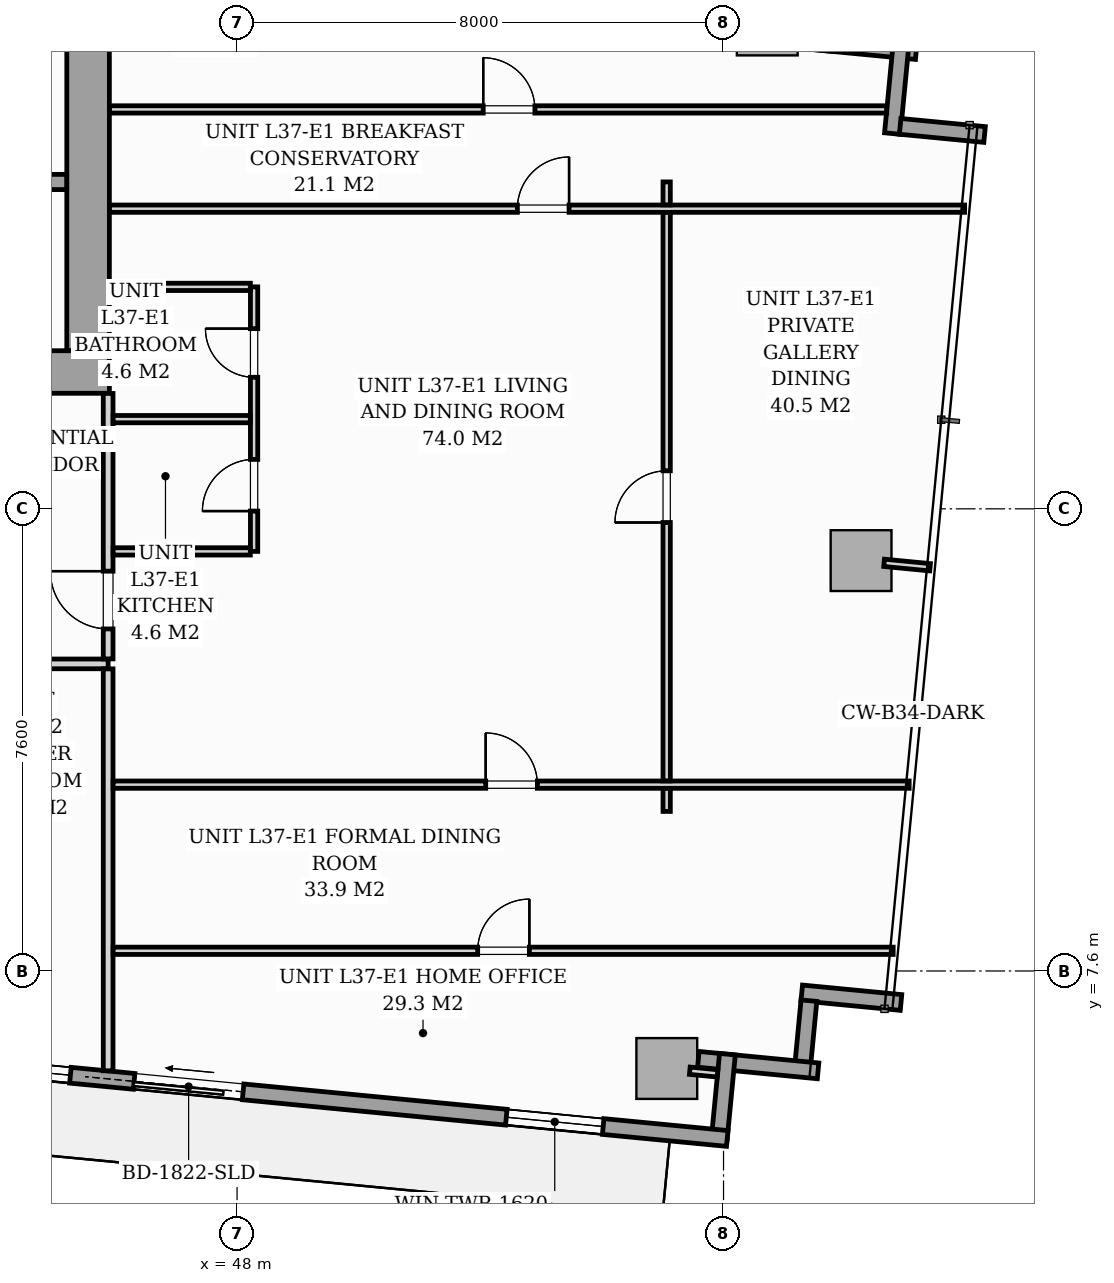
"""IFC4 building model, lengths in metres.
Left out: names, types, materials, properties, quantities, classifications, styles, units other than length and angle.
Written with IfcOpenShell. Run it as: python <this file> out.ifc"""

import sys

from ifc_helpers import new_model, si_unit, direction, frame, frame_2d, origin, origin_2d, place, context, subcontext, project, spatial, rectangle, i_section, extrude, source, transform, mapped, element, fill, save


model = new_model("IFC4")
c1 = context("Model", 3, precision=1e-05, world=origin(), true_north=direction((0.0, 1.0)))
c2 = subcontext(c1, "Body", "Model", "MODEL_VIEW")
j1 = project(units=[si_unit("LENGTHUNIT", "METRE"), si_unit("PLANEANGLEUNIT", "RADIAN")], contexts=[c1])
p1 = place(None, origin())
s1 = spatial("IfcSite", under=j1, at=p1, CompositionType="ELEMENT")
p2 = place(p1, origin())
s2 = spatial("IfcBuilding", under=s1, at=p2, CompositionType="ELEMENT")
p3 = place(p2, frame((0.0, 0.0, 131.0)))
s3 = spatial("IfcBuildingStorey", under=s2, at=p3, CompositionType="ELEMENT", Elevation=131.0)
m1 = source(origin(), c2, "Body", "SweptSolid", [
    extrude(i_section(OverallWidth=0.421, OverallDepth=0.465, WebThickness=0.045, FlangeThickness=0.073, FilletRadius=0.018, at=origin_2d()), origin(), (0.0, 0.0, 1.0), 3.196),
])
p4 = place(p3, frame((45.6, 17.4, 0.002), z_axis=(0.0, 0.0, 1.0), x_axis=(1.0, 0.0, 0.0)))
e1 = element("IfcColumn", 1, at=p4, inside=s3, PredefinedType="PILASTER", context=c2, shape_type="MappedRepresentation", body=[
    mapped(m1, transform((0.0, 0.0, 0.0), scale=1.0)),
])
m2 = source(origin(), c2, "Body", "SweptSolid", [
    extrude(rectangle(XDim=1.0, YDim=1.0, at=origin_2d()), origin(), (0.0, 0.0, 1.0), 3.196),
])
for number, where, z_axis, x_axis in (
    (2, (55.067, 5.996, 0.002), (0.0, 0.0, 1.0), (0.995, -0.096, 0.0)),
    (3, (56.719, 23.157, 0.002), (0.0, 0.0, 1.0), (0.995, -0.096, 0.0)),
    (4, (58.262, 14.348, 0.002), (0.0, 0.0, 1.0), (0.995, -0.096, 0.0)),
):
    element("IfcColumn", number, at=place(p3, frame(where, z_axis=z_axis, x_axis=x_axis)), inside=s3, PredefinedType="COLUMN", context=c2, shape_type="MappedRepresentation", body=[
        mapped(m2, transform((0.0, 0.0, 0.0), scale=1.0)),
    ])
p5 = place(p3, frame((57.2, 22.909, 0.0), z_axis=(0.0, 0.0, 1.0), x_axis=(0.995401789159, -0.095787672171, 0.0)))
e5 = element("IfcWall", 5, at=p5, inside=s3, PredefinedType="STANDARD", context=c2, shape_type="SweptSolid", body=[
    extrude(rectangle(XDim=1.978, YDim=0.26, at=frame_2d((0.989, 0.0))), origin(), (0.0, 0.0, 1.0), 2.94),
])
for number, where, z_axis, x_axis in (
    (6, (58.912, 22.76, 0.0), (0.0, 0.0, 1.0), (-0.096, -0.995, 0.0)),
    (7, (58.905, 21.49, 0.0), (0.0, 0.0, 1.0), (0.995, -0.096, 0.0)),
):
    element("IfcWall", number, at=place(p3, frame(where, z_axis=z_axis, x_axis=x_axis)), inside=s3, PredefinedType="STANDARD", context=c2, shape_type="SweptSolid", body=[
        extrude(rectangle(XDim=1.395, YDim=0.26, at=frame_2d((0.698, 0.0))), origin(), (0.0, 0.0, 1.0), 2.94),
    ])
p6 = place(p3, frame((58.919, 7.082, 0.0), z_axis=(0.0, 0.0, 1.0), x_axis=(-0.995393194909, 0.095876939504, 0.0)))
e8 = element("IfcWall", 8, at=p6, inside=s3, PredefinedType="STANDARD", context=c2, shape_type="SweptSolid", body=[
    extrude(rectangle(XDim=1.64, YDim=0.26, at=frame_2d((0.82, 0.0))), origin(), (0.0, 0.0, 1.0), 2.94),
])
p7 = place(p3, frame((57.405, 7.112, 0.0), z_axis=(0.0, 0.0, 1.0), x_axis=(-0.095971333708, -0.995384098279, 0.0)))
e9 = element("IfcWall", 9, at=p7, inside=s3, PredefinedType="STANDARD", context=c2, shape_type="SweptSolid", body=[
    extrude(rectangle(XDim=1.15, YDim=0.26, at=frame_2d((0.575, 0.0))), origin(), (0.0, 0.0, 1.0), 2.94),
])
p8 = place(p3, frame((57.555, 5.958, 0.0), z_axis=(0.0, 0.0, 1.0), x_axis=(-0.995401789159, 0.095787672171, 0.0)))
e10 = element("IfcWall", 10, at=p8, inside=s3, PredefinedType="STANDARD", context=c2, shape_type="SweptSolid", body=[
    extrude(rectangle(XDim=1.978, YDim=0.26, at=frame_2d((0.989, 0.0))), origin(), (0.0, 0.0, 1.0), 2.94),
])
p9 = place(p3, frame((56.064, 6.232, 0.0), z_axis=(0.0, 0.0, 1.0), x_axis=(-0.09589913835, -0.995391056452, 0.0)))
e11 = element("IfcWall", 11, at=p9, inside=s3, PredefinedType="STANDARD", context=c2, shape_type="SweptSolid", body=[
    extrude(rectangle(XDim=1.395, YDim=0.26, at=frame_2d((0.698, 0.0))), origin(), (0.0, 0.0, 1.0), 2.94),
])
p10 = place(p3, frame((56.061, 4.845, 0.0), z_axis=(0.0, 0.0, 1.0), x_axis=(-0.995395976631, 0.095848055311, 0.0)))
e12 = element("IfcWall", 12, at=p10, inside=s3, PredefinedType="STANDARD", context=c2, shape_type="SweptSolid", body=[
    extrude(rectangle(XDim=17.01, YDim=0.26, at=frame_2d((8.505, 0.0))), origin(), (0.0, 0.0, 1.0), 2.94),
])
p11 = place(p10, frame((7.999, 0.0, 0.0)))
e13 = element("IfcOpeningElement", 13, at=p11, cuts=e12, PredefinedType="OPENING", context=c2, shape_type="SweptSolid", body=[
    extrude(rectangle(XDim=1.8, YDim=2.06, at=frame_2d((0.9, 1.03))), frame((0.0, 0.14, 0.0), z_axis=(0.0, -1.0, 0.0), x_axis=(1.0, 0.0, 0.0)), (0.0, 0.0, 1.0), 0.28),
])
p12 = place(p10, frame((2.05, 0.0, 0.65)))
e14 = element("IfcOpeningElement", 14, at=p12, cuts=e12, PredefinedType="OPENING", context=c2, shape_type="SweptSolid", body=[
    extrude(rectangle(XDim=1.6, YDim=1.5, at=frame_2d((0.8, 0.75))), frame((0.0, 0.14, 0.0), z_axis=(0.0, -1.0, 0.0), x_axis=(1.0, 0.0, 0.0)), (0.0, 0.0, 1.0), 0.28),
])
p13 = place(p10, frame((10.852, 0.0, 0.75)))
e15 = element("IfcOpeningElement", 15, at=p13, cuts=e12, PredefinedType="OPENING", context=c2, shape_type="SweptSolid", body=[
    extrude(rectangle(XDim=1.6, YDim=1.5, at=frame_2d((0.8, 0.75))), frame((0.0, 0.14, 0.0), z_axis=(0.0, -1.0, 0.0), x_axis=(1.0, 0.0, 0.0)), (0.0, 0.0, 1.0), 0.28),
])
p14 = place(p3, frame((26.1, 17.45, 0.0), z_axis=(0.0, 0.0, 1.0), x_axis=(1.0, 0.0, 0.0)))
e16 = element("IfcWall", 16, at=p14, inside=s3, PredefinedType="SHEAR", context=c2, shape_type="SweptSolid", body=[
    extrude(rectangle(XDim=19.8, YDim=0.7, at=frame_2d((9.9, 0.0))), origin(), (0.0, 0.0, 1.0), 3.2),
])
p15 = place(p14, frame((1.05, 0.0, 0.0)))
e17 = element("IfcOpeningElement", 17, at=p15, cuts=e16, PredefinedType="OPENING", context=c2, shape_type="SweptSolid", body=[
    extrude(rectangle(XDim=0.95, YDim=2.06, at=frame_2d((0.475, 1.03))), frame((0.0, 0.36, 0.0), z_axis=(0.0, -1.0, 0.0), x_axis=(1.0, 0.0, 0.0)), (0.0, 0.0, 1.0), 0.72),
])
p16 = place(p14, frame((9.48, 0.0, 0.0)))
e18 = element("IfcOpeningElement", 18, at=p16, cuts=e16, PredefinedType="OPENING", context=c2, shape_type="SweptSolid", body=[
    extrude(rectangle(XDim=0.85, YDim=2.0, at=frame_2d((0.425, 1.0))), frame((0.0, 0.36, 0.0), z_axis=(0.0, -1.0, 0.0), x_axis=(1.0, 0.0, 0.0)), (0.0, 0.0, 1.0), 0.72),
])
p17 = place(p14, frame((17.65, 0.0, 0.0)))
e19 = element("IfcOpeningElement", 19, at=p17, cuts=e16, PredefinedType="OPENING", context=c2, shape_type="SweptSolid", body=[
    extrude(rectangle(XDim=0.95, YDim=2.06, at=frame_2d((0.475, 1.03))), frame((0.0, 0.36, 0.0), z_axis=(0.0, -1.0, 0.0), x_axis=(1.0, 0.0, 0.0)), (0.0, 0.0, 1.0), 0.72),
])
p18 = place(p3, frame((45.55, 17.802, 0.0), z_axis=(0.0, 0.0, 1.0), x_axis=(0.0, 1.0, 0.0)))
e20 = element("IfcWall", 20, at=p18, inside=s3, PredefinedType="SHEAR", context=c2, shape_type="SweptSolid", body=[
    extrude(rectangle(XDim=5.796, YDim=0.7, at=frame_2d((2.898, 0.0))), origin(), (0.0, 0.0, 1.0), 3.2),
])
p19 = place(p3, frame((37.05, 20.575, 0.0), z_axis=(0.0, 0.0, 1.0), x_axis=(1.0, 0.0, 0.0)))
e21 = element("IfcWall", 21, at=p19, inside=s3, PredefinedType="SOLIDWALL", context=c2, shape_type="SweptSolid", body=[
    extrude(rectangle(XDim=8.148, YDim=0.25, at=frame_2d((4.074, 0.0))), origin(), (0.0, 0.0, 1.0), 3.2),
])
p20 = place(p19, frame((6.6, 0.0, 0.0)))
e22 = element("IfcOpeningElement", 22, at=p20, cuts=e21, PredefinedType="OPENING", context=c2, shape_type="SweptSolid", body=[
    extrude(rectangle(XDim=0.95, YDim=2.06, at=frame_2d((0.475, 1.03))), frame((0.0, 0.135, 0.0), z_axis=(0.0, -1.0, 0.0), x_axis=(1.0, 0.0, 0.0)), (0.0, 0.0, 1.0), 0.27),
])
p21 = place(p3, frame((22.05, 12.65, 0.0), z_axis=(0.0, 0.0, 1.0), x_axis=(1.0, 0.0, 0.0)))
e23 = element("IfcWall", 23, at=p21, inside=s3, PredefinedType="PARTITIONING", context=c2, shape_type="SweptSolid", body=[
    extrude(rectangle(XDim=23.83, YDim=0.16, at=frame_2d((11.915, 0.0))), origin(), (0.0, 0.0, 1.0), 2.94),
])
p22 = place(p21, frame((3.0, 0.0, 0.0)))
e24 = element("IfcOpeningElement", 24, at=p22, cuts=e23, PredefinedType="OPENING", context=c2, shape_type="SweptSolid", body=[
    extrude(rectangle(XDim=0.95, YDim=2.06, at=frame_2d((0.475, 1.03))), frame((0.0, 0.09, 0.0), z_axis=(0.0, -1.0, 0.0), x_axis=(1.0, 0.0, 0.0)), (0.0, 0.0, 1.0), 0.18),
])
p23 = place(p21, frame((15.485, 0.0, 0.0)))
e25 = element("IfcOpeningElement", 25, at=p23, cuts=e23, PredefinedType="OPENING", context=c2, shape_type="SweptSolid", body=[
    extrude(rectangle(XDim=0.95, YDim=2.06, at=frame_2d((0.475, 1.03))), frame((0.0, 0.09, 0.0), z_axis=(0.0, -1.0, 0.0), x_axis=(1.0, 0.0, 0.0)), (0.0, 0.0, 1.0), 0.18),
])
p24 = place(p3, frame((45.88, 5.958, 0.0), z_axis=(0.0, 0.0, 1.0), x_axis=(0.0, 1.0, 0.0)))
e26 = element("IfcWall", 26, at=p24, inside=s3, PredefinedType="PARTITIONING", context=c2, shape_type="SweptSolid", body=[
    extrude(rectangle(XDim=6.61, YDim=0.16, at=frame_2d((3.305, 0.0))), origin(), (0.0, 0.0, 1.0), 2.94),
])
p25 = place(p3, frame((45.88, 12.732, 0.0), z_axis=(0.0, 0.0, 1.0), x_axis=(0.0, 1.0, 0.0)))
e27 = element("IfcWall", 27, at=p25, inside=s3, PredefinedType="PARTITIONING", context=c2, shape_type="SweptSolid", body=[
    extrude(rectangle(XDim=4.366, YDim=0.16, at=frame_2d((2.183, 0.0))), origin(), (0.0, 0.0, 1.0), 2.94),
])
p26 = place(p25, frame((0.493, 0.0, 0.0)))
e28 = element("IfcOpeningElement", 28, at=p26, cuts=e27, PredefinedType="OPENING", context=c2, shape_type="SweptSolid", body=[
    extrude(rectangle(XDim=0.95, YDim=2.06, at=frame_2d((0.475, 1.03))), frame((0.0, 0.09, 0.0), z_axis=(0.0, -1.0, 0.0), x_axis=(1.0, 0.0, 0.0)), (0.0, 0.0, 1.0), 0.18),
])
p27 = place(p3, frame((48.28, 14.5, 0.0), z_axis=(0.0, 0.0, 1.0), x_axis=(0.0, 1.0, 0.0)))
e29 = element("IfcWall", 29, at=p27, inside=s3, PredefinedType="PARTITIONING", context=c2, shape_type="SweptSolid", body=[
    extrude(rectangle(XDim=4.35, YDim=0.12, at=frame_2d((2.175, 0.0))), origin(), (0.0, 0.0, 1.0), 2.94),
])
p28 = place(p27, frame((0.663, 0.0, 0.0)))
e30 = element("IfcOpeningElement", 30, at=p28, cuts=e29, PredefinedType="OPENING", context=c2, shape_type="SweptSolid", body=[
    extrude(rectangle(XDim=0.85, YDim=2.05, at=frame_2d((0.425, 1.025))), frame((0.0, 0.07, 0.0), z_axis=(0.0, -1.0, 0.0), x_axis=(1.0, 0.0, 0.0)), (0.0, 0.0, 1.0), 0.14),
])
p29 = place(p27, frame((2.863, 0.0, 0.0)))
e31 = element("IfcOpeningElement", 31, at=p29, cuts=e29, PredefinedType="OPENING", context=c2, shape_type="SweptSolid", body=[
    extrude(rectangle(XDim=0.8, YDim=2.02, at=frame_2d((0.4, 1.01))), frame((0.0, 0.07, 0.0), z_axis=(0.0, -1.0, 0.0), x_axis=(1.0, 0.0, 0.0)), (0.0, 0.0, 1.0), 0.14),
])
p30 = place(p3, frame((45.962, 16.675, 0.0), z_axis=(0.0, 0.0, 1.0), x_axis=(1.0, 0.0, 0.0)))
e32 = element("IfcWall", 32, at=p30, inside=s3, PredefinedType="PARTITIONING", context=c2, shape_type="SweptSolid", body=[
    extrude(rectangle(XDim=2.256, YDim=0.12, at=frame_2d((1.128, 0.0))), origin(), (0.0, 0.0, 1.0), 2.063),
])
p31 = place(p3, frame((45.962, 14.5, 0.0), z_axis=(0.0, 0.0, 1.0), x_axis=(1.0, 0.0, 0.0)))
e33 = element("IfcWall", 33, at=p31, inside=s3, PredefinedType="PARTITIONING", context=c2, shape_type="SweptSolid", body=[
    extrude(rectangle(XDim=2.256, YDim=0.12, at=frame_2d((1.128, 0.0))), origin(), (0.0, 0.0, 1.0), 2.94),
])
p32 = place(p3, frame((45.902, 18.85, 0.0), z_axis=(0.0, 0.0, 1.0), x_axis=(1.0, 0.0, 0.0)))
e34 = element("IfcWall", 34, at=p32, inside=s3, PredefinedType="PARTITIONING", context=c2, shape_type="SweptSolid", body=[
    extrude(rectangle(XDim=2.316, YDim=0.12, at=frame_2d((1.158, 0.0))), origin(), (0.0, 0.0, 1.0), 2.94),
])
p33 = place(p3, frame((45.902, 21.768, 0.0), z_axis=(0.0, 0.0, 1.0), x_axis=(1.0, 0.0, 0.0)))
e35 = element("IfcWall", 35, at=p33, inside=s3, PredefinedType="PARTITIONING", context=c2, shape_type="SweptSolid", body=[
    extrude(rectangle(XDim=12.781, YDim=0.12, at=frame_2d((6.391, 0.0))), origin(), (0.0, 0.0, 1.0), 2.94),
])
p34 = place(p33, frame((6.146, 0.0, 0.0)))
e36 = element("IfcOpeningElement", 36, at=p34, cuts=e35, PredefinedType="OPENING", context=c2, shape_type="SweptSolid", body=[
    extrude(rectangle(XDim=0.85, YDim=2.05, at=frame_2d((0.425, 1.025))), frame((0.0, 0.07, 0.0), z_axis=(0.0, -1.0, 0.0), x_axis=(1.0, 0.0, 0.0)), (0.0, 0.0, 1.0), 0.14),
])
p35 = place(p3, frame((45.962, 7.932, 0.0), z_axis=(0.0, 0.0, 1.0), x_axis=(1.0, 0.0, 0.0)))
e37 = element("IfcWall", 37, at=p35, inside=s3, PredefinedType="PARTITIONING", context=c2, shape_type="SweptSolid", body=[
    extrude(rectangle(XDim=12.828, YDim=0.12, at=frame_2d((6.414, 0.0))), origin(), (0.0, 0.0, 1.0), 2.94),
])
p36 = place(p35, frame((5.995, 0.0, 0.0)))
e38 = element("IfcOpeningElement", 38, at=p36, cuts=e37, PredefinedType="OPENING", context=c2, shape_type="SweptSolid", body=[
    extrude(rectangle(XDim=0.85, YDim=2.05, at=frame_2d((0.425, 1.025))), frame((0.0, 0.07, 0.0), z_axis=(0.0, -1.0, 0.0), x_axis=(1.0, 0.0, 0.0)), (0.0, 0.0, 1.0), 0.14),
])
p37 = place(p3, frame((45.962, 10.664, 0.0), z_axis=(0.0, 0.0, 1.0), x_axis=(1.0, 0.0, 0.0)))
e39 = element("IfcWall", 39, at=p37, inside=s3, PredefinedType="PARTITIONING", context=c2, shape_type="SweptSolid", body=[
    extrude(rectangle(XDim=13.091, YDim=0.12, at=frame_2d((6.545, 0.0))), origin(), (0.0, 0.0, 1.0), 2.94),
])
p38 = place(p37, frame((6.127, 0.0, 0.0)))
e40 = element("IfcOpeningElement", 40, at=p38, cuts=e39, PredefinedType="OPENING", context=c2, shape_type="SweptSolid", body=[
    extrude(rectangle(XDim=0.85, YDim=2.05, at=frame_2d((0.425, 1.025))), frame((0.0, 0.07, 0.0), z_axis=(0.0, -1.0, 0.0), x_axis=(1.0, 0.0, 0.0)), (0.0, 0.0, 1.0), 0.14),
])
p39 = place(p3, frame((45.902, 20.136, 0.0), z_axis=(0.0, 0.0, 1.0), x_axis=(1.0, 0.0, 0.0)))
e41 = element("IfcWall", 41, at=p39, inside=s3, PredefinedType="PARTITIONING", context=c2, shape_type="SweptSolid", body=[
    extrude(rectangle(XDim=14.063, YDim=0.12, at=frame_2d((7.031, 0.0))), origin(), (0.0, 0.0, 1.0), 2.94),
])
p40 = place(p39, frame((6.708, 0.0, 0.0)))
e42 = element("IfcOpeningElement", 42, at=p40, cuts=e41, PredefinedType="OPENING", context=c2, shape_type="SweptSolid", body=[
    extrude(rectangle(XDim=0.85, YDim=2.05, at=frame_2d((0.425, 1.025))), frame((0.0, 0.07, 0.0), z_axis=(0.0, -1.0, 0.0), x_axis=(1.0, 0.0, 0.0)), (0.0, 0.0, 1.0), 0.14),
])
p41 = place(p3, frame((55.065, 10.224, 0.0), z_axis=(0.0, 0.0, 1.0), x_axis=(0.0, 1.0, 0.0)))
e43 = element("IfcWall", 43, at=p41, inside=s3, PredefinedType="PARTITIONING", context=c2, shape_type="SweptSolid", body=[
    extrude(rectangle(XDim=0.378, YDim=0.12, at=frame_2d((0.189, 0.0))), origin(), (0.0, 0.0, 1.0), 2.94),
])
p42 = place(p3, frame((55.065, 10.726, 0.0), z_axis=(0.0, 0.0, 1.0), x_axis=(0.0, 1.0, 0.0)))
e44 = element("IfcWall", 44, at=p42, inside=s3, PredefinedType="PARTITIONING", context=c2, shape_type="SweptSolid", body=[
    extrude(rectangle(XDim=9.348, YDim=0.12, at=frame_2d((4.674, 0.0))), origin(), (0.0, 0.0, 1.0), 2.94),
])
p43 = place(p42, frame((4.249, 0.0, 0.0)))
e45 = element("IfcOpeningElement", 45, at=p43, cuts=e44, PredefinedType="OPENING", context=c2, shape_type="SweptSolid", body=[
    extrude(rectangle(XDim=0.85, YDim=2.05, at=frame_2d((0.425, 1.025))), frame((0.0, 0.07, 0.0), z_axis=(0.0, -1.0, 0.0), x_axis=(1.0, 0.0, 0.0)), (0.0, 0.0, 1.0), 0.14),
])
p44 = place(p3, frame((55.065, 20.198, 0.0), z_axis=(0.0, 0.0, 1.0), x_axis=(0.0, 1.0, 0.0)))
e46 = element("IfcWall", 46, at=p44, inside=s3, PredefinedType="PARTITIONING", context=c2, shape_type="SweptSolid", body=[
    extrude(rectangle(XDim=0.378, YDim=0.12, at=frame_2d((0.189, 0.0))), origin(), (0.0, 0.0, 1.0), 2.94),
])
p45 = place(p3, frame((55.445, 5.96, 0.0), z_axis=(0.0, 0.0, 1.0), x_axis=(0.995384576284, -0.09596637586, 0.0)))
e47 = element("IfcWall", 47, at=p45, inside=s3, PredefinedType="PARTITIONING", context=c2, shape_type="SweptSolid", body=[
    extrude(rectangle(XDim=0.458, YDim=0.12, at=frame_2d((0.229, 0.0))), origin(), (0.0, 0.0, 1.0), 2.94),
])
p46 = place(p3, frame((58.64, 14.312, 0.0), z_axis=(0.0, 0.0, 1.0), x_axis=(0.995377786728, -0.096036772582, 0.0)))
e48 = element("IfcWall", 48, at=p46, inside=s3, PredefinedType="PARTITIONING", context=c2, shape_type="SweptSolid", body=[
    extrude(rectangle(XDim=0.76, YDim=0.12, at=frame_2d((0.38, 0.0))), origin(), (0.0, 0.0, 1.0), 2.94),
])
m3 = source(origin(), c2, "Body", "SweptSolid", [
    extrude(rectangle(XDim=1.8, YDim=2.06, at=frame_2d((0.9, 1.03))), frame((0.0, 0.025, 0.0), z_axis=(0.0, -1.0, 0.0), x_axis=(1.0, 0.0, 0.0)), (0.0, 0.0, 1.0), 0.05),
])
p47 = place(p11, origin())
e49 = element("IfcDoor", 49, at=p47, inside=s3, OperationType="SLIDING_TO_RIGHT", PredefinedType="DOOR", context=c2, shape_type="MappedRepresentation", body=[
    mapped(m3, transform((0.0, 0.0, 0.0), scale=1.0)),
])
fill(e13, e49)
m4 = source(origin(), c2, "Body", "SweptSolid", [
    extrude(rectangle(XDim=1.6, YDim=1.5, at=frame_2d((0.8, 0.75))), frame((0.0, 0.03, 0.0), z_axis=(0.0, -1.0, 0.0), x_axis=(1.0, 0.0, 0.0)), (0.0, 0.0, 1.0), 0.06),
])
p48 = place(p12, origin())
e50 = element("IfcWindow", 50, at=p48, inside=s3, PartitioningType="SINGLE_PANEL", PredefinedType="WINDOW", context=c2, shape_type="MappedRepresentation", body=[
    mapped(m4, transform((0.0, 0.0, 0.0), scale=1.0)),
])
fill(e14, e50)
p49 = place(p13, origin())
e51 = element("IfcWindow", 51, at=p49, inside=s3, PartitioningType="SINGLE_PANEL", PredefinedType="WINDOW", context=c2, shape_type="MappedRepresentation", body=[
    mapped(m4, transform((0.0, 0.0, 0.0), scale=1.0)),
])
fill(e15, e51)
m5 = source(origin(), c2, "Body", "SweptSolid", [
    extrude(rectangle(XDim=0.95, YDim=2.06, at=frame_2d((0.475, 1.03))), frame((0.0, 0.025, 0.0), z_axis=(0.0, -1.0, 0.0), x_axis=(1.0, 0.0, 0.0)), (0.0, 0.0, 1.0), 0.05),
])
p50 = place(p26, origin())
e52 = element("IfcDoor", 52, at=p50, inside=s3, OperationType="SINGLE_SWING_RIGHT", PredefinedType="DOOR", context=c2, shape_type="MappedRepresentation", body=[
    mapped(m5, transform((0.0, 0.0, 0.0), scale=1.0)),
])
fill(e28, e52)
m6 = source(origin(), c2, "Body", "SweptSolid", [
    extrude(rectangle(XDim=0.85, YDim=2.05, at=frame_2d((0.425, 1.025))), frame((0.0, 0.025, 0.0), z_axis=(0.0, -1.0, 0.0), x_axis=(1.0, 0.0, 0.0)), (0.0, 0.0, 1.0), 0.05),
])
p51 = place(p28, origin())
e53 = element("IfcDoor", 53, at=p51, inside=s3, OperationType="SINGLE_SWING_LEFT", PredefinedType="DOOR", context=c2, shape_type="MappedRepresentation", body=[
    mapped(m6, transform((0.0, 0.0, 0.0), scale=1.0)),
])
fill(e30, e53)
m7 = source(origin(), c2, "Body", "SweptSolid", [
    extrude(rectangle(XDim=0.8, YDim=2.02, at=frame_2d((0.4, 1.01))), frame((0.0, 0.025, 0.0), z_axis=(0.0, -1.0, 0.0), x_axis=(1.0, 0.0, 0.0)), (0.0, 0.0, 1.0), 0.05),
])
p52 = place(p29, origin())
e54 = element("IfcDoor", 54, at=p52, inside=s3, OperationType="SINGLE_SWING_RIGHT", PredefinedType="DOOR", context=c2, shape_type="MappedRepresentation", body=[
    mapped(m7, transform((0.0, 0.0, 0.0), scale=1.0)),
])
fill(e31, e54)
p53 = place(p34, origin())
e55 = element("IfcDoor", 55, at=p53, inside=s3, OperationType="SINGLE_SWING_LEFT", PredefinedType="DOOR", context=c2, shape_type="MappedRepresentation", body=[
    mapped(m6, transform((0.0, 0.0, 0.0), scale=1.0)),
])
fill(e36, e55)
p54 = place(p36, origin())
e56 = element("IfcDoor", 56, at=p54, inside=s3, OperationType="SINGLE_SWING_RIGHT", PredefinedType="DOOR", context=c2, shape_type="MappedRepresentation", body=[
    mapped(m6, transform((0.0, 0.0, 0.0), scale=1.0)),
])
fill(e38, e56)
p55 = place(p38, origin())
e57 = element("IfcDoor", 57, at=p55, inside=s3, OperationType="SINGLE_SWING_LEFT", PredefinedType="DOOR", context=c2, shape_type="MappedRepresentation", body=[
    mapped(m6, transform((0.0, 0.0, 0.0), scale=1.0)),
])
fill(e40, e57)
p56 = place(p40, origin())
e58 = element("IfcDoor", 58, at=p56, inside=s3, OperationType="SINGLE_SWING_RIGHT", PredefinedType="DOOR", context=c2, shape_type="MappedRepresentation", body=[
    mapped(m6, transform((0.0, 0.0, 0.0), scale=1.0)),
])
fill(e42, e58)
p57 = place(p43, origin())
e59 = element("IfcDoor", 59, at=p57, inside=s3, OperationType="SINGLE_SWING_LEFT", PredefinedType="DOOR", context=c2, shape_type="MappedRepresentation", body=[
    mapped(m6, transform((0.0, 0.0, 0.0), scale=1.0)),
])
fill(e45, e59)
save(model, sys.argv[1])
